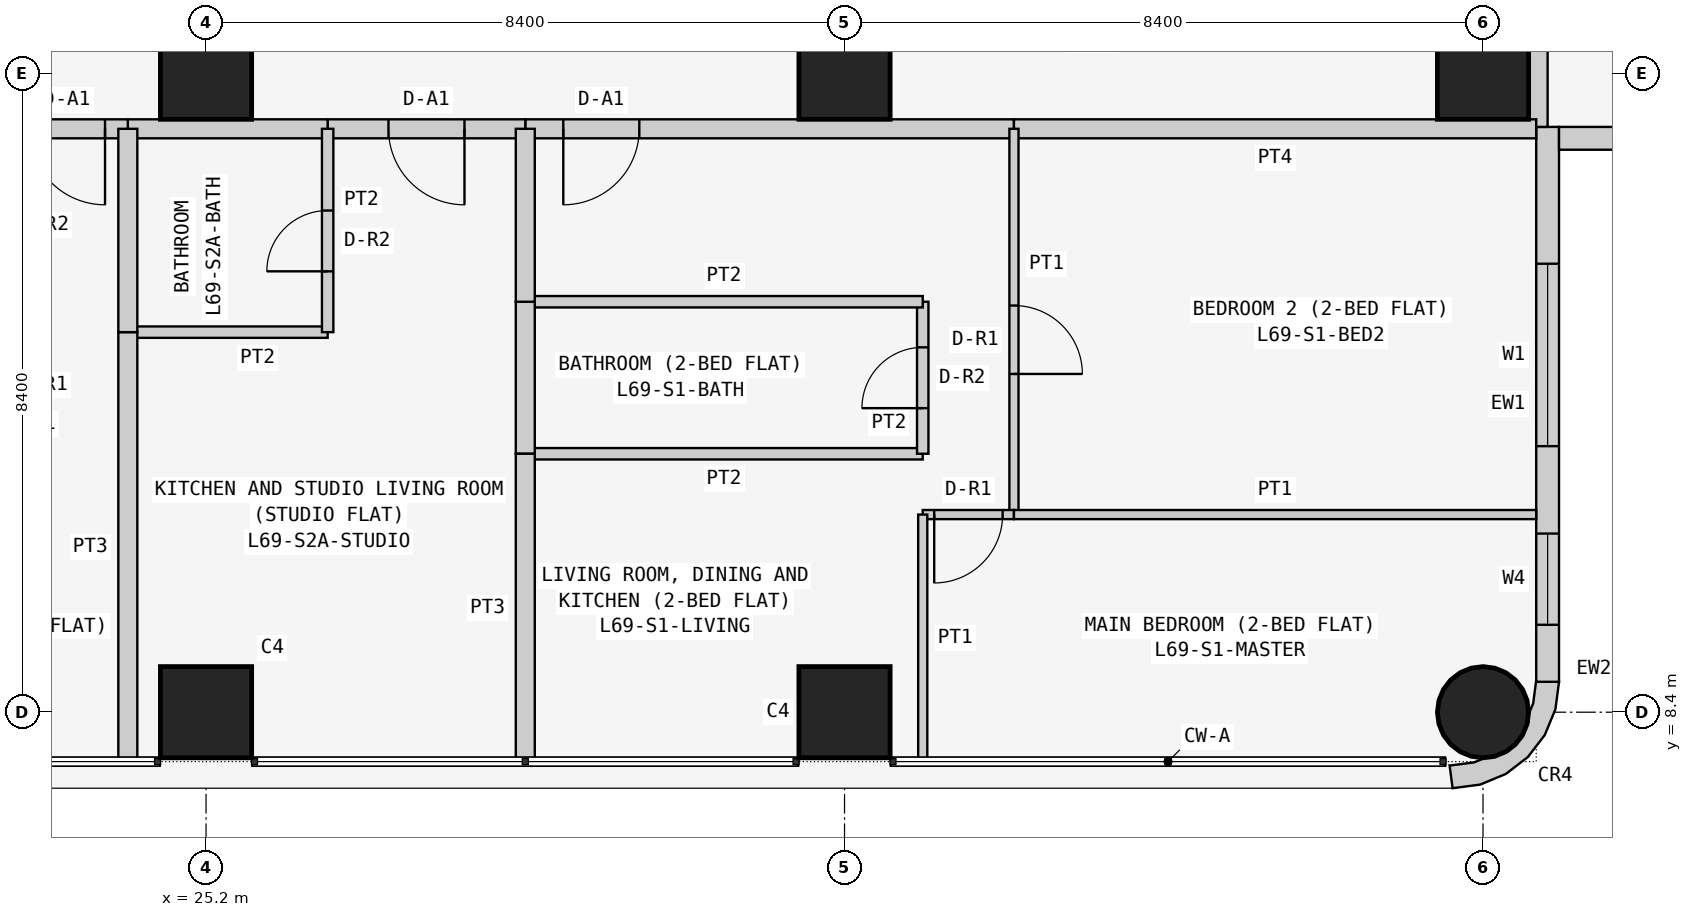
"""IFC4 building model, lengths in metres.
Left out: names, types, materials, properties, quantities, classifications, styles, units other than length and angle.
Written with IfcOpenShell. Run it as: python <this file> out.ifc"""

import sys

from ifc_helpers import new_model, si_unit, direction, frame, frame_2d, origin, origin_2d, place, context, subcontext, project, spatial, polyline, rectangle, circle, outline, extrude, element, fill, save


model = new_model("IFC4")
c1 = context("Model", 3, precision=1e-05, world=origin(), true_north=direction((0.0, 1.0)))
c2 = subcontext(c1, "Body", "Model", "MODEL_VIEW")
j1 = project(units=[si_unit("LENGTHUNIT", "METRE"), si_unit("PLANEANGLEUNIT", "RADIAN")], contexts=[c1])
p1 = place(None, origin())
s1 = spatial("IfcSite", under=j1, at=p1, CompositionType="ELEMENT")
p2 = place(p1, origin())
s2 = spatial("IfcBuilding", under=s1, at=p2, CompositionType="ELEMENT")
p3 = place(p2, frame((0.0, 0.0, 264.9)))
s3 = spatial("IfcBuildingStorey", under=s2, at=p3, CompositionType="ELEMENT", Elevation=264.9)
for number, where, z_axis, x_axis in (
    (1, (25.2, 8.4, 0.0), (0.0, 0.0, 1.0), (1.0, 0.0, 0.0)),
    (2, (25.2, 16.8, 0.0), (0.0, 0.0, 1.0), (1.0, 0.0, 0.0)),
    (3, (33.6, 8.4, 0.0), (0.0, 0.0, 1.0), (1.0, 0.0, 0.0)),
    (4, (33.6, 16.8, 0.0), (0.0, 0.0, 1.0), (1.0, 0.0, 0.0)),
):
    element("IfcColumn", number, at=place(p3, frame(where, z_axis=z_axis, x_axis=x_axis)), inside=s3, PredefinedType="COLUMN", context=c2, shape_type="SweptSolid", body=[
        extrude(rectangle(XDim=1.2, YDim=1.2, at=origin_2d()), origin(), (0.0, 0.0, 1.0), 3.6),
    ])
p4 = place(p3, frame((42.0, 8.4, 0.0), z_axis=(0.0, 0.0, 1.0), x_axis=(1.0, 0.0, 0.0)))
e5 = element("IfcColumn", 5, at=p4, inside=s3, PredefinedType="COLUMN", context=c2, shape_type="SweptSolid", body=[
    extrude(circle(Radius=0.6, at=origin_2d()), origin(), (0.0, 0.0, 1.0), 3.6),
])
p5 = place(p3, frame((42.0, 16.8, 0.0), z_axis=(0.0, 0.0, 1.0), x_axis=(1.0, 0.0, 0.0)))
e6 = element("IfcColumn", 6, at=p5, inside=s3, PredefinedType="COLUMN", context=c2, shape_type="SweptSolid", body=[
    extrude(rectangle(XDim=1.2, YDim=1.2, at=origin_2d()), origin(), (0.0, 0.0, 1.0), 3.6),
])
p6 = place(p3, frame((42.85, 8.8, 0.0), z_axis=(0.0, 0.0, 1.0), x_axis=(0.0, 1.0, 0.0)))
e7 = element("IfcWall", 7, at=p6, inside=s3, PredefinedType="SOLIDWALL", context=c2, shape_type="SweptSolid", body=[
    extrude(rectangle(XDim=7.3, YDim=0.3, at=frame_2d((3.65, 0.0))), origin(), (0.0, 0.0, 1.0), 3.45),
])
p7 = place(p6, frame((3.1, 0.0, 0.9)))
e8 = element("IfcOpeningElement", 8, at=p7, cuts=e7, PredefinedType="OPENING", context=c2, shape_type="SweptSolid", body=[
    extrude(rectangle(XDim=2.4, YDim=1.5, at=frame_2d((1.2, 0.75))), frame((0.0, 0.16, 0.0), z_axis=(0.0, -1.0, 0.0), x_axis=(1.0, 0.0, 0.0)), (0.0, 0.0, 1.0), 0.32),
])
p8 = place(p6, frame((0.75, 0.0, 0.9)))
e9 = element("IfcOpeningElement", 9, at=p8, cuts=e7, PredefinedType="OPENING", context=c2, shape_type="SweptSolid", body=[
    extrude(rectangle(XDim=1.2, YDim=1.5, at=frame_2d((0.6, 0.75))), frame((0.0, 0.16, 0.0), z_axis=(0.0, -1.0, 0.0), x_axis=(1.0, 0.0, 0.0)), (0.0, 0.0, 1.0), 0.32),
])
p9 = place(p3, frame((43.0, 15.95, 0.0), z_axis=(0.0, 0.0, 1.0), x_axis=(1.0, 0.0, 0.0)))
e10 = element("IfcWall", 10, at=p9, inside=s3, PredefinedType="SOLIDWALL", context=c2, shape_type="SweptSolid", body=[
    extrude(rectangle(XDim=7.0, YDim=0.3, at=frame_2d((3.5, 0.0))), origin(), (0.0, 0.0, 1.0), 3.45),
])
p10 = place(p9, frame((1.5, 0.0, 0.9)))
e11 = element("IfcOpeningElement", 11, at=p10, cuts=e10, PredefinedType="OPENING", context=c2, shape_type="SweptSolid", body=[
    extrude(rectangle(XDim=2.4, YDim=1.5, at=frame_2d((1.2, 0.75))), frame((0.0, 0.16, 0.0), z_axis=(0.0, -1.0, 0.0), x_axis=(1.0, 0.0, 0.0)), (0.0, 0.0, 1.0), 0.32),
])
p11 = place(p9, frame((5.05, 0.0, 0.9)))
e12 = element("IfcOpeningElement", 12, at=p11, cuts=e10, PredefinedType="OPENING", context=c2, shape_type="SweptSolid", body=[
    extrude(rectangle(XDim=1.2, YDim=1.5, at=frame_2d((0.6, 0.75))), frame((0.0, 0.16, 0.0), z_axis=(0.0, -1.0, 0.0), x_axis=(1.0, 0.0, 0.0)), (0.0, 0.0, 1.0), 0.32),
])
p12 = place(p3, frame((41.638, 7.824, 0.0), z_axis=(0.0, 0.0, 1.0), x_axis=(0.707106781187, -0.707106781187, 0.0)))
e13 = element("IfcWall", 13, at=p12, inside=s3, PredefinedType="SOLIDWALL", context=c2, shape_type="SweptSolid", body=[
    extrude(outline(polyline([(0.033, 1.469), (0.047, 1.455), (0.233, 1.212), (0.292, 1.069), (0.358, 1.003), (0.449, 0.782), (0.449, 0.543), (0.358, 0.322), (0.292, 0.257), (0.233, 0.114), (0.047, -0.129), (0.033, -0.143), (0.273, -0.327), (0.495, -0.037), (0.635, 0.301), (0.683, 0.663), (0.635, 1.025), (0.495, 1.363), (0.273, 1.653), (0.033, 1.469)])), origin(), (0.0, 0.0, 1.0), 3.45),
])
p13 = place(p3, frame((42.725, 22.971, 0.0), z_axis=(0.0, 0.0, 1.0), x_axis=(0.0, -1.0, 0.0)))
e14 = element("IfcWall", 14, at=p13, inside=s3, PredefinedType="PARTITIONING", context=c2, shape_type="SweptSolid", body=[
    extrude(rectangle(XDim=6.871, YDim=0.25, at=frame_2d((3.436, 0.0))), origin(), (0.0, 0.0, 1.0), 3.45),
])
p14 = place(p3, frame((35.829, 16.075, 0.0), z_axis=(0.0, 0.0, 1.0), x_axis=(-1.0, 0.0, 0.0)))
e15 = element("IfcWall", 15, at=p14, inside=s3, PredefinedType="PARTITIONING", context=c2, shape_type="SweptSolid", body=[
    extrude(rectangle(XDim=6.429, YDim=0.25, at=frame_2d((3.215, 0.0))), origin(), (0.0, 0.0, 1.0), 3.45),
])
p15 = place(p14, frame((4.929, 0.0, 0.0)))
e16 = element("IfcOpeningElement", 16, at=p15, cuts=e15, PredefinedType="OPENING", context=c2, shape_type="SweptSolid", body=[
    extrude(rectangle(XDim=1.0, YDim=2.1, at=frame_2d((0.5, 1.05))), frame((0.0, 0.135, 0.0), z_axis=(0.0, -1.0, 0.0), x_axis=(1.0, 0.0, 0.0)), (0.0, 0.0, 1.0), 0.27),
])
p16 = place(p3, frame((42.7, 16.075, 0.0), z_axis=(0.0, 0.0, 1.0), x_axis=(-1.0, 0.0, 0.0)))
e17 = element("IfcWall", 17, at=p16, inside=s3, PredefinedType="PARTITIONING", context=c2, shape_type="SweptSolid", body=[
    extrude(rectangle(XDim=6.871, YDim=0.25, at=frame_2d((3.436, 0.0))), origin(), (0.0, 0.0, 1.0), 3.45),
])
p17 = place(p3, frame((29.4, 16.075, 0.0), z_axis=(0.0, 0.0, 1.0), x_axis=(-1.0, 0.0, 0.0)))
e18 = element("IfcWall", 18, at=p17, inside=s3, PredefinedType="PARTITIONING", context=c2, shape_type="SweptSolid", body=[
    extrude(rectangle(XDim=2.6, YDim=0.25, at=frame_2d((1.3, 0.0))), origin(), (0.0, 0.0, 1.0), 3.45),
])
p18 = place(p17, frame((0.8, 0.0, 0.0)))
e19 = element("IfcOpeningElement", 19, at=p18, cuts=e18, PredefinedType="OPENING", context=c2, shape_type="SweptSolid", body=[
    extrude(rectangle(XDim=1.0, YDim=2.1, at=frame_2d((0.5, 1.05))), frame((0.0, 0.135, 0.0), z_axis=(0.0, -1.0, 0.0), x_axis=(1.0, 0.0, 0.0)), (0.0, 0.0, 1.0), 0.27),
])
p19 = place(p3, frame((26.8, 16.075, 0.0), z_axis=(0.0, 0.0, 1.0), x_axis=(-1.0, 0.0, 0.0)))
e20 = element("IfcWall", 20, at=p19, inside=s3, PredefinedType="PARTITIONING", context=c2, shape_type="SweptSolid", body=[
    extrude(rectangle(XDim=2.629, YDim=0.25, at=frame_2d((1.314, 0.0))), origin(), (0.0, 0.0, 1.0), 3.45),
])
p20 = place(p3, frame((24.171, 16.075, 0.0), z_axis=(0.0, 0.0, 1.0), x_axis=(-1.0, 0.0, 0.0)))
e21 = element("IfcWall", 21, at=p20, inside=s3, PredefinedType="PARTITIONING", context=c2, shape_type="SweptSolid", body=[
    extrude(rectangle(XDim=1.6, YDim=0.25, at=frame_2d((0.8, 0.0))), origin(), (0.0, 0.0, 1.0), 3.45),
])
p21 = place(p20, frame((0.3, 0.0, 0.0)))
e22 = element("IfcOpeningElement", 22, at=p21, cuts=e21, PredefinedType="OPENING", context=c2, shape_type="SweptSolid", body=[
    extrude(rectangle(XDim=1.0, YDim=2.1, at=frame_2d((0.5, 1.05))), frame((0.0, 0.135, 0.0), z_axis=(0.0, -1.0, 0.0), x_axis=(1.0, 0.0, 0.0)), (0.0, 0.0, 1.0), 0.27),
])
p22 = place(p3, frame((29.4, 11.8, 0.0), z_axis=(0.0, 0.0, 1.0), x_axis=(1.0, 0.0, 0.0)))
e23 = element("IfcWall", 23, at=p22, inside=s3, PredefinedType="PARTITIONING", context=c2, shape_type="SweptSolid", body=[
    extrude(rectangle(XDim=5.229, YDim=0.15, at=frame_2d((2.615, 0.0))), origin(), (0.0, 0.0, 1.0), 3.45),
])
p23 = place(p3, frame((34.629, 11.8, 0.0), z_axis=(0.0, 0.0, 1.0), x_axis=(0.0, 1.0, 0.0)))
e24 = element("IfcWall", 24, at=p23, inside=s3, PredefinedType="PARTITIONING", context=c2, shape_type="SweptSolid", body=[
    extrude(rectangle(XDim=2.0, YDim=0.15, at=frame_2d((1.0, 0.0))), origin(), (0.0, 0.0, 1.0), 3.45),
])
p24 = place(p23, frame((0.6, 0.0, 0.0)))
e25 = element("IfcOpeningElement", 25, at=p24, cuts=e24, PredefinedType="OPENING", context=c2, shape_type="SweptSolid", body=[
    extrude(rectangle(XDim=0.8, YDim=2.1, at=frame_2d((0.4, 1.05))), frame((0.0, 0.085, 0.0), z_axis=(0.0, -1.0, 0.0), x_axis=(1.0, 0.0, 0.0)), (0.0, 0.0, 1.0), 0.17),
])
p25 = place(p3, frame((34.629, 13.8, 0.0), z_axis=(0.0, 0.0, 1.0), x_axis=(-1.0, 0.0, 0.0)))
e26 = element("IfcWall", 26, at=p25, inside=s3, PredefinedType="PARTITIONING", context=c2, shape_type="SweptSolid", body=[
    extrude(rectangle(XDim=5.229, YDim=0.15, at=frame_2d((2.615, 0.0))), origin(), (0.0, 0.0, 1.0), 3.45),
])
p26 = place(p3, frame((29.4, 13.8, 0.0), z_axis=(0.0, 0.0, 1.0), x_axis=(0.0, -1.0, 0.0)))
e27 = element("IfcWall", 27, at=p26, inside=s3, PredefinedType="PARTITIONING", context=c2, shape_type="SweptSolid", body=[
    extrude(rectangle(XDim=2.0, YDim=0.25, at=frame_2d((1.0, 0.0))), origin(), (0.0, 0.0, 1.0), 2.848),
])
p27 = place(p3, frame((35.829, 16.075, 0.0), z_axis=(0.0, 0.0, 1.0), x_axis=(0.0, -1.0, 0.0)))
e28 = element("IfcWall", 28, at=p27, inside=s3, PredefinedType="PARTITIONING", context=c2, shape_type="SweptSolid", body=[
    extrude(rectangle(XDim=5.075, YDim=0.12, at=frame_2d((2.538, 0.0))), origin(), (0.0, 0.0, 1.0), 3.45),
])
p28 = place(p27, frame((2.325, 0.0, 0.0)))
e29 = element("IfcOpeningElement", 29, at=p28, cuts=e28, PredefinedType="OPENING", context=c2, shape_type="SweptSolid", body=[
    extrude(rectangle(XDim=0.9, YDim=2.1, at=frame_2d((0.45, 1.05))), frame((0.0, 0.07, 0.0), z_axis=(0.0, -1.0, 0.0), x_axis=(1.0, 0.0, 0.0)), (0.0, 0.0, 1.0), 0.14),
])
p29 = place(p3, frame((35.829, 11.0, 0.0), z_axis=(0.0, 0.0, 1.0), x_axis=(-1.0, 0.0, 0.0)))
e30 = element("IfcWall", 30, at=p29, inside=s3, PredefinedType="PARTITIONING", context=c2, shape_type="SweptSolid", body=[
    extrude(rectangle(XDim=1.2, YDim=0.12, at=frame_2d((0.6, 0.0))), origin(), (0.0, 0.0, 1.0), 3.45),
])
p30 = place(p29, frame((0.149, 0.0, 0.0)))
e31 = element("IfcOpeningElement", 31, at=p30, cuts=e30, PredefinedType="OPENING", context=c2, shape_type="SweptSolid", body=[
    extrude(rectangle(XDim=0.9, YDim=2.1, at=frame_2d((0.45, 1.05))), frame((0.0, 0.07, 0.0), z_axis=(0.0, -1.0, 0.0), x_axis=(1.0, 0.0, 0.0)), (0.0, 0.0, 1.0), 0.14),
])
p31 = place(p3, frame((34.629, 11.0, 0.0), z_axis=(0.0, 0.0, 1.0), x_axis=(0.0, -1.0, 0.0)))
e32 = element("IfcWall", 32, at=p31, inside=s3, PredefinedType="PARTITIONING", context=c2, shape_type="SweptSolid", body=[
    extrude(rectangle(XDim=3.25, YDim=0.12, at=frame_2d((1.625, 0.0))), origin(), (0.0, 0.0, 1.0), 3.45),
])
p32 = place(p3, frame((29.4, 7.75, 0.0), z_axis=(0.0, 0.0, 1.0), x_axis=(0.0, 1.0, 0.0)))
e33 = element("IfcWall", 33, at=p32, inside=s3, PredefinedType="PARTITIONING", context=c2, shape_type="SweptSolid", body=[
    extrude(rectangle(XDim=4.05, YDim=0.25, at=frame_2d((2.025, 0.0))), origin(), (0.0, 0.0, 1.0), 2.848),
])
p33 = place(p3, frame((29.4, 13.8, 0.0), z_axis=(0.0, 0.0, 1.0), x_axis=(0.0, 1.0, 0.0)))
e34 = element("IfcWall", 34, at=p33, inside=s3, PredefinedType="PARTITIONING", context=c2, shape_type="SweptSolid", body=[
    extrude(rectangle(XDim=2.275, YDim=0.25, at=frame_2d((1.137, 0.0))), origin(), (0.0, 0.0, 1.0), 2.848),
])
p34 = place(p3, frame((35.829, 11.0, 0.0), z_axis=(0.0, 0.0, 1.0), x_axis=(1.0, 0.0, 0.0)))
e35 = element("IfcWall", 35, at=p34, inside=s3, PredefinedType="PARTITIONING", context=c2, shape_type="SweptSolid", body=[
    extrude(rectangle(XDim=6.871, YDim=0.12, at=frame_2d((3.436, 0.0))), origin(), (0.0, 0.0, 1.0), 3.45),
])
p35 = place(p3, frame((24.171, 13.4, 0.0), z_axis=(0.0, 0.0, 1.0), x_axis=(1.0, 0.0, 0.0)))
e36 = element("IfcWall", 36, at=p35, inside=s3, PredefinedType="PARTITIONING", context=c2, shape_type="SweptSolid", body=[
    extrude(rectangle(XDim=2.629, YDim=0.15, at=frame_2d((1.314, 0.0))), origin(), (0.0, 0.0, 1.0), 3.45),
])
p36 = place(p3, frame((26.8, 13.4, 0.0), z_axis=(0.0, 0.0, 1.0), x_axis=(0.0, 1.0, 0.0)))
e37 = element("IfcWall", 37, at=p36, inside=s3, PredefinedType="PARTITIONING", context=c2, shape_type="SweptSolid", body=[
    extrude(rectangle(XDim=2.675, YDim=0.15, at=frame_2d((1.337, 0.0))), origin(), (0.0, 0.0, 1.0), 3.45),
])
p37 = place(p36, frame((0.8, 0.0, 0.0)))
e38 = element("IfcOpeningElement", 38, at=p37, cuts=e37, PredefinedType="OPENING", context=c2, shape_type="SweptSolid", body=[
    extrude(rectangle(XDim=0.8, YDim=2.1, at=frame_2d((0.4, 1.05))), frame((0.0, 0.085, 0.0), z_axis=(0.0, -1.0, 0.0), x_axis=(1.0, 0.0, 0.0)), (0.0, 0.0, 1.0), 0.17),
])
p38 = place(p3, frame((24.171, 7.75, 0.0), z_axis=(0.0, 0.0, 1.0), x_axis=(0.0, 1.0, 0.0)))
e39 = element("IfcWall", 39, at=p38, inside=s3, PredefinedType="PARTITIONING", context=c2, shape_type="SweptSolid", body=[
    extrude(rectangle(XDim=5.65, YDim=0.25, at=frame_2d((2.825, 0.0))), origin(), (0.0, 0.0, 1.0), 3.45),
])
p39 = place(p3, frame((24.171, 13.4, 0.0), z_axis=(0.0, 0.0, 1.0), x_axis=(0.0, 1.0, 0.0)))
e40 = element("IfcWall", 40, at=p39, inside=s3, PredefinedType="PARTITIONING", context=c2, shape_type="SweptSolid", body=[
    extrude(rectangle(XDim=2.675, YDim=0.25, at=frame_2d((1.337, 0.0))), origin(), (0.0, 0.0, 1.0), 3.45),
])
p40 = place(p7, origin())
e41 = element("IfcWindow", 41, at=p40, inside=s3, PartitioningType="SINGLE_PANEL", PredefinedType="WINDOW", context=c2, shape_type="SweptSolid", body=[
    extrude(rectangle(XDim=2.4, YDim=1.5, at=frame_2d((1.2, 0.75))), frame((0.0, 0.03, 0.0), z_axis=(0.0, -1.0, 0.0), x_axis=(1.0, 0.0, 0.0)), (0.0, 0.0, 1.0), 0.06),
])
fill(e8, e41)
p41 = place(p8, origin())
e42 = element("IfcWindow", 42, at=p41, inside=s3, PartitioningType="SINGLE_PANEL", PredefinedType="WINDOW", context=c2, shape_type="SweptSolid", body=[
    extrude(rectangle(XDim=1.2, YDim=1.5, at=frame_2d((0.6, 0.75))), frame((0.0, 0.03, 0.0), z_axis=(0.0, -1.0, 0.0), x_axis=(1.0, 0.0, 0.0)), (0.0, 0.0, 1.0), 0.06),
])
fill(e9, e42)
p42 = place(p15, origin())
e43 = element("IfcDoor", 43, at=p42, inside=s3, OperationType="SINGLE_SWING_RIGHT", PredefinedType="DOOR", context=c2, shape_type="SweptSolid", body=[
    extrude(rectangle(XDim=1.0, YDim=2.1, at=frame_2d((0.5, 1.05))), frame((0.0, 0.025, 0.0), z_axis=(0.0, -1.0, 0.0), x_axis=(1.0, 0.0, 0.0)), (0.0, 0.0, 1.0), 0.05),
])
fill(e16, e43)
p43 = place(p24, origin())
e44 = element("IfcDoor", 44, at=p43, inside=s3, OperationType="SINGLE_SWING_LEFT", PredefinedType="DOOR", context=c2, shape_type="SweptSolid", body=[
    extrude(rectangle(XDim=0.8, YDim=2.1, at=frame_2d((0.4, 1.05))), frame((0.0, 0.025, 0.0), z_axis=(0.0, -1.0, 0.0), x_axis=(1.0, 0.0, 0.0)), (0.0, 0.0, 1.0), 0.05),
])
fill(e25, e44)
p44 = place(p28, origin())
e45 = element("IfcDoor", 45, at=p44, inside=s3, OperationType="SINGLE_SWING_RIGHT", PredefinedType="DOOR", context=c2, shape_type="SweptSolid", body=[
    extrude(rectangle(XDim=0.9, YDim=2.1, at=frame_2d((0.45, 1.05))), frame((0.0, 0.025, 0.0), z_axis=(0.0, -1.0, 0.0), x_axis=(1.0, 0.0, 0.0)), (0.0, 0.0, 1.0), 0.05),
])
fill(e29, e45)
p45 = place(p30, origin())
e46 = element("IfcDoor", 46, at=p45, inside=s3, OperationType="SINGLE_SWING_RIGHT", PredefinedType="DOOR", context=c2, shape_type="SweptSolid", body=[
    extrude(rectangle(XDim=0.9, YDim=2.1, at=frame_2d((0.45, 1.05))), frame((0.0, 0.025, 0.0), z_axis=(0.0, -1.0, 0.0), x_axis=(1.0, 0.0, 0.0)), (0.0, 0.0, 1.0), 0.05),
])
fill(e31, e46)
p46 = place(p18, origin())
e47 = element("IfcDoor", 47, at=p46, inside=s3, OperationType="SINGLE_SWING_LEFT", PredefinedType="DOOR", context=c2, shape_type="SweptSolid", body=[
    extrude(rectangle(XDim=1.0, YDim=2.1, at=frame_2d((0.5, 1.05))), frame((0.0, 0.025, 0.0), z_axis=(0.0, -1.0, 0.0), x_axis=(1.0, 0.0, 0.0)), (0.0, 0.0, 1.0), 0.05),
])
fill(e19, e47)
p47 = place(p37, origin())
e48 = element("IfcDoor", 48, at=p47, inside=s3, OperationType="SINGLE_SWING_LEFT", PredefinedType="DOOR", context=c2, shape_type="SweptSolid", body=[
    extrude(rectangle(XDim=0.8, YDim=2.1, at=frame_2d((0.4, 1.05))), frame((0.0, 0.025, 0.0), z_axis=(0.0, -1.0, 0.0), x_axis=(1.0, 0.0, 0.0)), (0.0, 0.0, 1.0), 0.05),
])
fill(e38, e48)
p48 = place(p21, origin())
e49 = element("IfcDoor", 49, at=p48, inside=s3, OperationType="SINGLE_SWING_LEFT", PredefinedType="DOOR", context=c2, shape_type="SweptSolid", body=[
    extrude(rectangle(XDim=1.0, YDim=2.1, at=frame_2d((0.5, 1.05))), frame((0.0, 0.025, 0.0), z_axis=(0.0, -1.0, 0.0), x_axis=(1.0, 0.0, 0.0)), (0.0, 0.0, 1.0), 0.05),
])
fill(e22, e49)
save(model, sys.argv[1])
